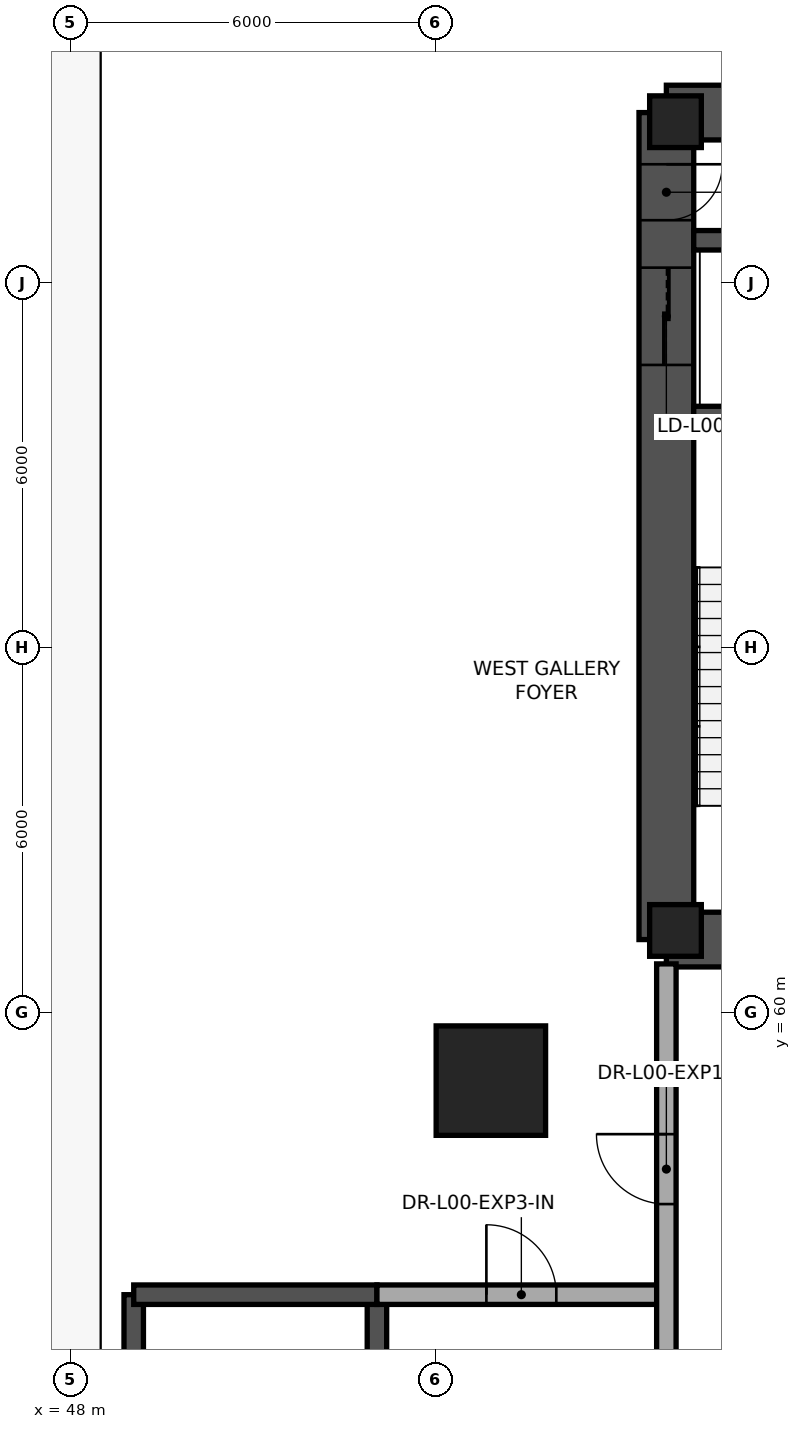
"""IFC4 building model, lengths in metres.
Left out: names, types, materials, properties, quantities, classifications, styles, units other than length and angle.
Written with IfcOpenShell. Run it as: python <this file> out.ifc"""

import sys

from ifc_helpers import new_model, si_unit, direction, frame, frame_2d, origin, origin_2d, place, context, subcontext, project, spatial, rectangle, extrude, element, fill, save


model = new_model("IFC4")
c1 = context("Model", 3, precision=1e-05, world=origin(), true_north=direction((0.0, 1.0)))
c2 = subcontext(c1, "Body", "Model", "MODEL_VIEW")
j1 = project(units=[si_unit("LENGTHUNIT", "METRE"), si_unit("PLANEANGLEUNIT", "RADIAN")], contexts=[c1])
p1 = place(None, origin())
s1 = spatial("IfcSite", under=j1, at=p1, CompositionType="ELEMENT")
p2 = place(p1, origin())
s2 = spatial("IfcBuilding", under=s1, at=p2, CompositionType="ELEMENT")
p3 = place(p2, origin())
s3 = spatial("IfcBuildingStorey", under=s2, at=p3, CompositionType="ELEMENT", Elevation=0.0)
p4 = place(p3, frame((57.8, 61.2, 0.0), z_axis=(0.0, 0.0, 1.0), x_axis=(1.0, 0.0, 0.0)))
e1 = element("IfcWall", 1, at=p4, inside=s3, PredefinedType="SHEAR", context=c2, shape_type="SweptSolid", body=[
    extrude(rectangle(XDim=16.4, YDim=0.9, at=frame_2d((8.2, 0.0))), origin(), (0.0, 0.0, 1.0), 5.4),
])
p5 = place(p4, frame((1.35, 0.0, 0.0)))
e2 = element("IfcOpeningElement", 2, at=p5, cuts=e1, PredefinedType="OPENING", context=c2, shape_type="SweptSolid", body=[
    extrude(rectangle(XDim=1.15, YDim=2.15, at=frame_2d((0.575, 1.075))), frame((0.0, 0.46, 0.0), z_axis=(0.0, -1.0, 0.0), x_axis=(1.0, 0.0, 0.0)), (0.0, 0.0, 1.0), 0.92),
])
p6 = place(p4, frame((6.1, 0.0, 0.0)))
e3 = element("IfcOpeningElement", 3, at=p6, cuts=e1, PredefinedType="OPENING", context=c2, shape_type="SweptSolid", body=[
    extrude(rectangle(XDim=1.6, YDim=2.15, at=frame_2d((0.8, 1.075))), frame((0.0, 0.46, 0.0), z_axis=(0.0, -1.0, 0.0), x_axis=(1.0, 0.0, 0.0)), (0.0, 0.0, 1.0), 0.92),
])
p7 = place(p4, frame((13.55, 0.0, 0.0)))
e4 = element("IfcOpeningElement", 4, at=p7, cuts=e1, PredefinedType="OPENING", context=c2, shape_type="SweptSolid", body=[
    extrude(rectangle(XDim=1.15, YDim=2.15, at=frame_2d((0.575, 1.075))), frame((0.0, 0.46, 0.0), z_axis=(0.0, -1.0, 0.0), x_axis=(1.0, 0.0, 0.0)), (0.0, 0.0, 1.0), 0.92),
])
p8 = place(p3, frame((64.85, 74.8, 0.0), z_axis=(0.0, 0.0, 1.0), x_axis=(-1.0, 0.0, 0.0)))
e5 = element("IfcWall", 5, at=p8, inside=s3, PredefinedType="SHEAR", context=c2, shape_type="SweptSolid", body=[
    extrude(rectangle(XDim=7.05, YDim=0.9, at=frame_2d((3.525, 0.0))), origin(), (0.0, 0.0, 1.0), 5.4),
])
p9 = place(p3, frame((57.8, 74.8, 0.0), z_axis=(0.0, 0.0, 1.0), x_axis=(0.0, -1.0, 0.0)))
e6 = element("IfcWall", 6, at=p9, inside=s3, PredefinedType="SHEAR", context=c2, shape_type="SweptSolid", body=[
    extrude(rectangle(XDim=13.6, YDim=0.9, at=frame_2d((6.8, 0.0))), origin(), (0.0, 0.0, 1.0), 5.4),
])
p10 = place(p9, frame((0.85, 0.0, 0.0)))
e7 = element("IfcOpeningElement", 7, at=p10, cuts=e6, PredefinedType="OPENING", context=c2, shape_type="SweptSolid", body=[
    extrude(rectangle(XDim=0.92, YDim=2.05, at=frame_2d((0.46, 1.025))), frame((0.0, 0.46, 0.0), z_axis=(0.0, -1.0, 0.0), x_axis=(1.0, 0.0, 0.0)), (0.0, 0.0, 1.0), 0.92),
])
p11 = place(p9, frame((2.55, 0.0, 0.0)))
e8 = element("IfcOpeningElement", 8, at=p11, cuts=e6, PredefinedType="OPENING", context=c2, shape_type="SweptSolid", body=[
    extrude(rectangle(XDim=1.6, YDim=2.3, at=frame_2d((0.8, 1.15))), frame((0.0, 0.46, 0.0), z_axis=(0.0, -1.0, 0.0), x_axis=(1.0, 0.0, 0.0)), (0.0, 0.0, 1.0), 0.92),
])
for number, where, z_axis, x_axis in (
    (9, (58.25, 69.81, 0.0), (0.0, 0.0, 1.0), (1.0, 0.0, 0.0)),
    (10, (58.25, 72.7, 0.0), (0.0, 0.0, 1.0), (1.0, 0.0, 0.0)),
):
    element("IfcWall", number, at=place(p3, frame(where, z_axis=z_axis, x_axis=x_axis)), inside=s3, PredefinedType="SHEAR", context=c2, shape_type="SweptSolid", body=[
        extrude(rectangle(XDim=3.84, YDim=0.32, at=frame_2d((1.92, 0.0))), origin(), (0.0, 0.0, 1.0), 5.4),
    ])
for number, where, z_axis, x_axis in (
    (11, (49.04, 47.04, 0.0), (0.0, 0.0, 1.0), (0.0, 1.0, 0.0)),
    (12, (53.04, 47.04, 0.0), (0.0, 0.0, 1.0), (0.0, 1.0, 0.0)),
):
    element("IfcWall", number, at=place(p3, frame(where, z_axis=z_axis, x_axis=x_axis)), inside=s3, PredefinedType="SHEAR", context=c2, shape_type="SweptSolid", body=[
        extrude(rectangle(XDim=8.32, YDim=0.32, at=frame_2d((4.16, 0.0))), origin(), (0.0, 0.0, 1.0), 5.4),
    ])
p12 = place(p3, frame((49.04, 55.36, 0.0), z_axis=(0.0, 0.0, 1.0), x_axis=(1.0, 0.0, 0.0)))
e13 = element("IfcWall", 13, at=p12, inside=s3, PredefinedType="SHEAR", context=c2, shape_type="SweptSolid", body=[
    extrude(rectangle(XDim=4.0, YDim=0.32, at=frame_2d((2.0, 0.0))), origin(), (0.0, 0.0, 1.0), 5.4),
])
for number, where, z_axis, x_axis in (
    (14, (57.95, 61.35, 0.0), (0.0, 0.0, 1.0), (1.0, 0.0, 0.0)),
    (15, (57.95, 74.65, 0.0), (0.0, 0.0, 1.0), (1.0, 0.0, 0.0)),
):
    element("IfcColumn", number, at=place(p3, frame(where, z_axis=z_axis, x_axis=x_axis)), inside=s3, PredefinedType="COLUMN", context=c2, shape_type="SweptSolid", body=[
        extrude(rectangle(XDim=0.85, YDim=0.85, at=origin_2d()), origin(), (0.0, 0.0, 1.0), 5.4),
    ])
p13 = place(p3, frame((54.914, 58.88, 0.0), z_axis=(0.0, 0.0, 1.0), x_axis=(1.0, 0.0, 0.0)))
e16 = element("IfcColumn", 16, at=p13, inside=s3, PredefinedType="COLUMN", context=c2, shape_type="SweptSolid", body=[
    extrude(rectangle(XDim=1.8, YDim=1.8, at=origin_2d()), origin(), (0.0, 0.0, 1.0), 5.4),
])
p14 = place(p3, frame((53.04, 55.36, 0.0), z_axis=(0.0, 0.0, 1.0), x_axis=(1.0, 0.0, 0.0)))
e17 = element("IfcWall", 17, at=p14, inside=s3, PredefinedType="STANDARD", context=c2, shape_type="SweptSolid", body=[
    extrude(rectangle(XDim=4.76, YDim=0.32, at=frame_2d((2.38, 0.0))), origin(), (0.0, 0.0, 1.0), 4.08),
])
p15 = place(p14, frame((1.8, 0.0, 0.0)))
e18 = element("IfcOpeningElement", 18, at=p15, cuts=e17, PredefinedType="OPENING", context=c2, shape_type="SweptSolid", body=[
    extrude(rectangle(XDim=1.15, YDim=2.15, at=frame_2d((0.575, 1.075))), frame((0.0, 0.17, 0.0), z_axis=(0.0, -1.0, 0.0), x_axis=(1.0, 0.0, 0.0)), (0.0, 0.0, 1.0), 0.34),
])
p16 = place(p3, frame((57.8, 44.05, 0.0), z_axis=(0.0, 0.0, 1.0), x_axis=(0.0, 1.0, 0.0)))
e19 = element("IfcWall", 19, at=p16, inside=s3, PredefinedType="STANDARD", context=c2, shape_type="SweptSolid", body=[
    extrude(rectangle(XDim=16.75, YDim=0.32, at=frame_2d((8.375, 0.0))), origin(), (0.0, 0.0, 1.0), 4.08),
])
p17 = place(p16, frame((12.8, 0.0, 0.0)))
e20 = element("IfcOpeningElement", 20, at=p17, cuts=e19, PredefinedType="OPENING", context=c2, shape_type="SweptSolid", body=[
    extrude(rectangle(XDim=1.15, YDim=2.15, at=frame_2d((0.575, 1.075))), frame((0.0, 0.17, 0.0), z_axis=(0.0, -1.0, 0.0), x_axis=(1.0, 0.0, 0.0)), (0.0, 0.0, 1.0), 0.34),
])
p18 = place(p10, origin())
e21 = element("IfcDoor", 21, at=p18, inside=s3, OperationType="SINGLE_SWING_LEFT", PredefinedType="DOOR", context=c2, shape_type="SweptSolid", body=[
    extrude(rectangle(XDim=0.92, YDim=2.05, at=frame_2d((0.46, 1.025))), frame((0.0, 0.025, 0.0), z_axis=(0.0, -1.0, 0.0), x_axis=(1.0, 0.0, 0.0)), (0.0, 0.0, 1.0), 0.05),
])
fill(e7, e21)
p19 = place(p11, origin())
e22 = element("IfcDoor", 22, at=p19, inside=s3, OperationType="DOUBLE_DOOR_SLIDING", PredefinedType="DOOR", context=c2, shape_type="SweptSolid", body=[
    extrude(rectangle(XDim=1.6, YDim=2.3, at=frame_2d((0.8, 1.15))), frame((0.0, 0.025, 0.0), z_axis=(0.0, -1.0, 0.0), x_axis=(1.0, 0.0, 0.0)), (0.0, 0.0, 1.0), 0.05),
])
fill(e8, e22)
p20 = place(p15, origin())
e23 = element("IfcDoor", 23, at=p20, inside=s3, OperationType="SINGLE_SWING_LEFT", PredefinedType="DOOR", context=c2, shape_type="SweptSolid", body=[
    extrude(rectangle(XDim=1.15, YDim=2.15, at=frame_2d((0.575, 1.075))), frame((0.0, 0.025, 0.0), z_axis=(0.0, -1.0, 0.0), x_axis=(1.0, 0.0, 0.0)), (0.0, 0.0, 1.0), 0.05),
])
fill(e18, e23)
p21 = place(p17, origin())
e24 = element("IfcDoor", 24, at=p21, inside=s3, OperationType="SINGLE_SWING_RIGHT", PredefinedType="DOOR", context=c2, shape_type="SweptSolid", body=[
    extrude(rectangle(XDim=1.15, YDim=2.15, at=frame_2d((0.575, 1.075))), frame((0.0, 0.025, 0.0), z_axis=(0.0, -1.0, 0.0), x_axis=(1.0, 0.0, 0.0)), (0.0, 0.0, 1.0), 0.05),
])
fill(e20, e24)
save(model, sys.argv[1])
